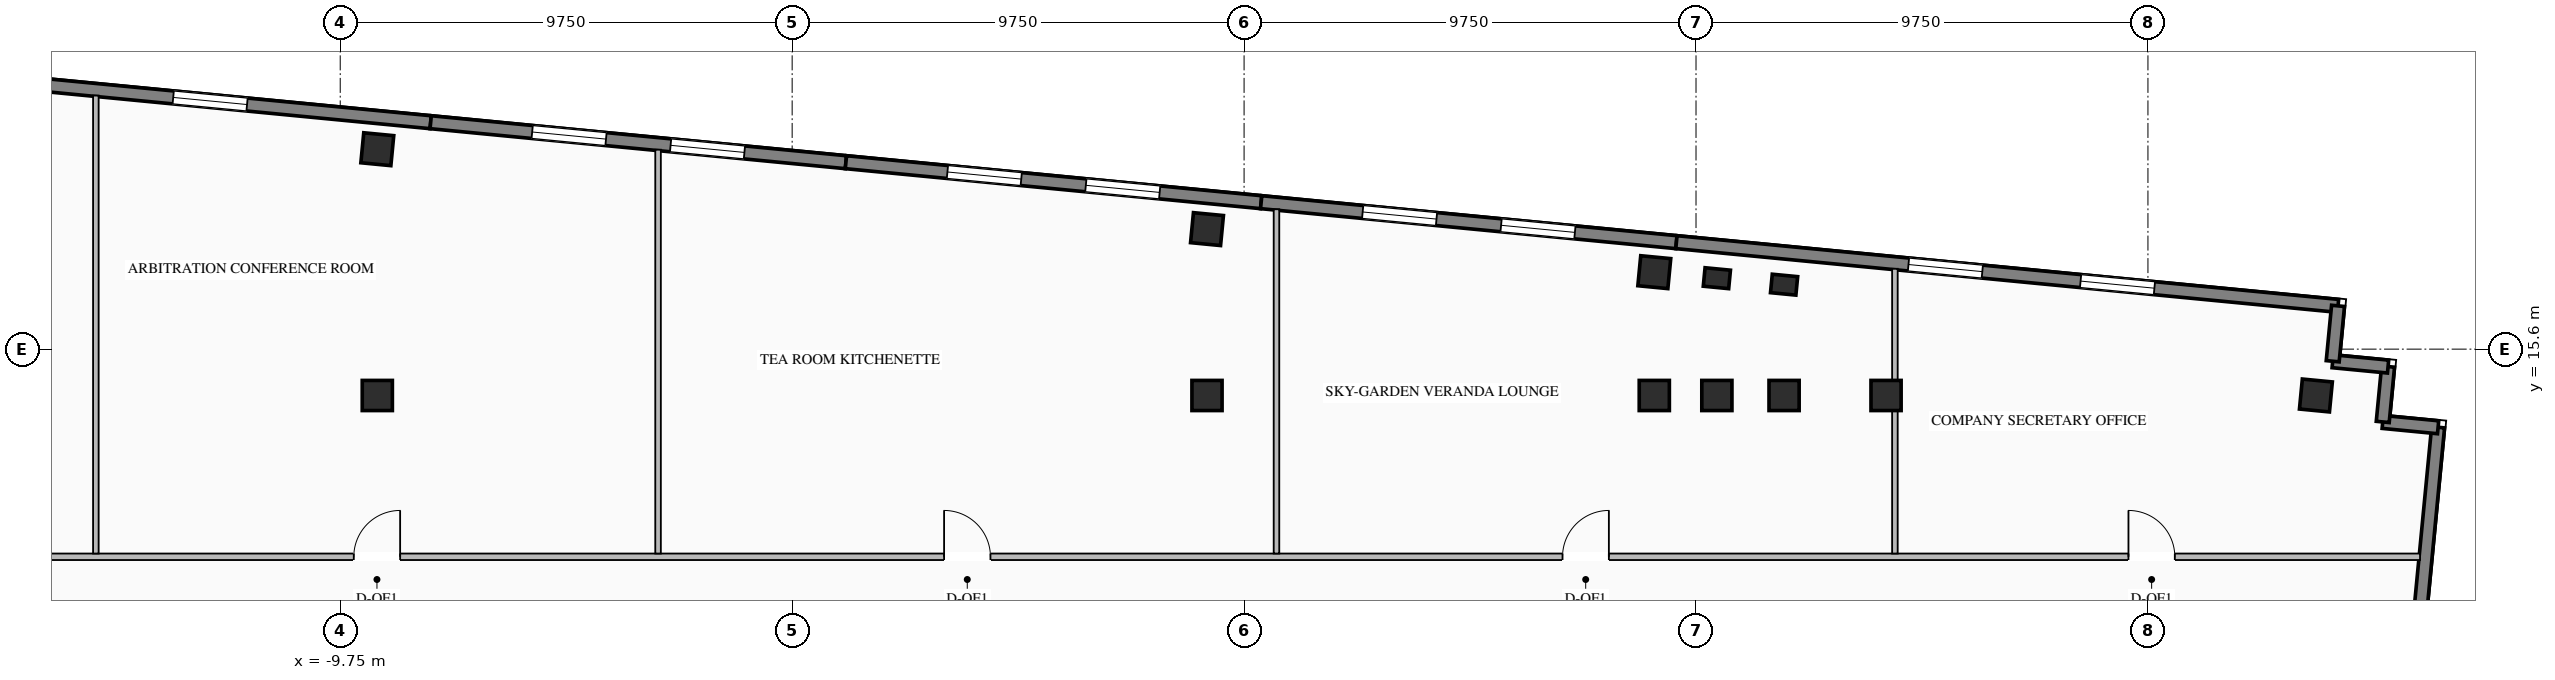
"""IFC4 building model, lengths in metres.
Left out: names, types, materials, properties, quantities, classifications, styles, units other than length and angle.
Written with IfcOpenShell. Run it as: python <this file> out.ifc"""

import sys

from ifc_helpers import new_model, si_unit, direction, frame, frame_2d, origin, origin_2d, place, context, subcontext, project, spatial, rectangle, i_section, extrude, element, fill, save


model = new_model("IFC4")
c1 = context("Model", 3, precision=1e-05, world=origin(), true_north=direction((0.0, 1.0)))
c2 = subcontext(c1, "Body", "Model", "MODEL_VIEW")
j1 = project(units=[si_unit("LENGTHUNIT", "METRE"), si_unit("PLANEANGLEUNIT", "RADIAN")], contexts=[c1])
p1 = place(None, origin())
s1 = spatial("IfcSite", under=j1, at=p1, CompositionType="ELEMENT")
p2 = place(p1, origin())
s2 = spatial("IfcBuilding", under=s1, at=p2, CompositionType="ELEMENT")
p3 = place(p2, frame((0.0, 0.0, 170.75)))
s3 = spatial("IfcBuildingStorey", under=s2, at=p3, CompositionType="ELEMENT", Elevation=170.75)
for number, where, z_axis, x_axis in (
    (1, (-8.95, 14.6, 0.0), (0.0, 0.0, 1.0), (1.0, 0.0, 0.0)),
    (2, (8.95, 14.6, 0.0), (0.0, 0.0, 1.0), (1.0, 0.0, 0.0)),
    (3, (18.6, 14.6, 0.0), (0.0, 0.0, 1.0), (1.0, 0.0, 0.0)),
    (4, (19.95, 14.6, 0.0), (0.0, 0.0, 1.0), (1.0, 0.0, 0.0)),
    (5, (21.4, 14.6, 0.0), (0.0, 0.0, 1.0), (1.0, 0.0, 0.0)),
    (6, (23.6, 14.6, 0.0), (0.0, 0.0, 1.0), (1.0, 0.0, 0.0)),
    (7, (-8.95, 19.913, 0.0), (0.0, 0.0, 1.0), (0.995, -0.096, 0.0)),
    (8, (8.95, 18.19, 0.0), (0.0, 0.0, 1.0), (0.995, -0.096, 0.0)),
    (9, (18.6, 17.26, 0.0), (0.0, 0.0, 1.0), (0.995, -0.096, 0.0)),
    (10, (32.874, 14.6, 0.0), (0.0, 0.0, 1.0), (0.995, -0.096, 0.0)),
):
    element("IfcColumn", number, at=place(p3, frame(where, z_axis=z_axis, x_axis=x_axis)), inside=s3, PredefinedType="COLUMN", context=c2, shape_type="SweptSolid", body=[
        extrude(i_section(OverallWidth=0.65, OverallDepth=0.65, WebThickness=0.028, FlangeThickness=0.04, at=origin_2d()), origin(), (0.0, 0.0, 1.0), 3.45),
    ])
for number, where, z_axis, x_axis in (
    (11, (19.95, 17.131, 0.0), (0.0, 0.0, 1.0), (0.995, -0.096, 0.0)),
    (12, (21.4, 16.991, 0.0), (0.0, 0.0, 1.0), (0.995, -0.096, 0.0)),
):
    element("IfcColumn", number, at=place(p3, frame(where, z_axis=z_axis, x_axis=x_axis)), inside=s3, PredefinedType="PILASTER", context=c2, shape_type="SweptSolid", body=[
        extrude(rectangle(XDim=0.55, YDim=0.4, at=origin_2d()), origin(), (0.0, 0.0, 1.0), 3.45),
    ])
p4 = place(p3, frame((-22.073, 21.87, 0.0), z_axis=(0.0, 0.0, 1.0), x_axis=(0.995395606285, -0.095851901334, 0.0)))
e13 = element("IfcWall", 13, at=p4, inside=s3, PredefinedType="STANDARD", context=c2, shape_type="SweptSolid", body=[
    extrude(rectangle(XDim=14.34, YDim=0.28, at=frame_2d((7.17, 0.0))), origin(), (0.0, 0.0, 1.0), 3.25),
])
p5 = place(p4, frame((3.98, 0.0, 0.76)))
e14 = element("IfcOpeningElement", 14, at=p5, cuts=e13, PredefinedType="OPENING", context=c2, shape_type="SweptSolid", body=[
    extrude(rectangle(XDim=1.6, YDim=1.95, at=frame_2d((0.8, 0.975))), frame((0.0, 0.15, 0.0), z_axis=(0.0, -1.0, 0.0), x_axis=(1.0, 0.0, 0.0)), (0.0, 0.0, 1.0), 0.3),
])
p6 = place(p4, frame((8.76, 0.0, 0.76)))
e15 = element("IfcOpeningElement", 15, at=p6, cuts=e13, PredefinedType="OPENING", context=c2, shape_type="SweptSolid", body=[
    extrude(rectangle(XDim=1.6, YDim=1.95, at=frame_2d((0.8, 0.975))), frame((0.0, 0.15, 0.0), z_axis=(0.0, -1.0, 0.0), x_axis=(1.0, 0.0, 0.0)), (0.0, 0.0, 1.0), 0.3),
])
p7 = place(p3, frame((-7.799, 20.496, 0.0), z_axis=(0.0, 0.0, 1.0), x_axis=(0.995396794462, -0.09583956164, 0.0)))
e16 = element("IfcWall", 16, at=p7, inside=s3, PredefinedType="STANDARD", context=c2, shape_type="SweptSolid", body=[
    extrude(rectangle(XDim=9.0, YDim=0.28, at=frame_2d((4.5, 0.0))), origin(), (0.0, 0.0, 1.0), 3.25),
])
p8 = place(p7, frame((2.2, 0.0, 0.76)))
e17 = element("IfcOpeningElement", 17, at=p8, cuts=e16, PredefinedType="OPENING", context=c2, shape_type="SweptSolid", body=[
    extrude(rectangle(XDim=1.6, YDim=1.95, at=frame_2d((0.8, 0.975))), frame((0.0, 0.15, 0.0), z_axis=(0.0, -1.0, 0.0), x_axis=(1.0, 0.0, 0.0)), (0.0, 0.0, 1.0), 0.3),
])
p9 = place(p7, frame((5.2, 0.0, 0.76)))
e18 = element("IfcOpeningElement", 18, at=p9, cuts=e16, PredefinedType="OPENING", context=c2, shape_type="SweptSolid", body=[
    extrude(rectangle(XDim=1.6, YDim=1.95, at=frame_2d((0.8, 0.975))), frame((0.0, 0.15, 0.0), z_axis=(0.0, -1.0, 0.0), x_axis=(1.0, 0.0, 0.0)), (0.0, 0.0, 1.0), 0.3),
])
p10 = place(p3, frame((1.16, 19.633, 0.0), z_axis=(0.0, 0.0, 1.0), x_axis=(0.995394455533, -0.09586385082, 0.0)))
e19 = element("IfcWall", 19, at=p10, inside=s3, PredefinedType="STANDARD", context=c2, shape_type="SweptSolid", body=[
    extrude(rectangle(XDim=9.0, YDim=0.28, at=frame_2d((4.5, 0.0))), origin(), (0.0, 0.0, 1.0), 3.25),
])
p11 = place(p10, frame((2.2, 0.0, 0.76)))
e20 = element("IfcOpeningElement", 20, at=p11, cuts=e19, PredefinedType="OPENING", context=c2, shape_type="SweptSolid", body=[
    extrude(rectangle(XDim=1.6, YDim=1.95, at=frame_2d((0.8, 0.975))), frame((0.0, 0.15, 0.0), z_axis=(0.0, -1.0, 0.0), x_axis=(1.0, 0.0, 0.0)), (0.0, 0.0, 1.0), 0.3),
])
p12 = place(p10, frame((5.2, 0.0, 0.76)))
e21 = element("IfcOpeningElement", 21, at=p12, cuts=e19, PredefinedType="OPENING", context=c2, shape_type="SweptSolid", body=[
    extrude(rectangle(XDim=1.6, YDim=1.95, at=frame_2d((0.8, 0.975))), frame((0.0, 0.15, 0.0), z_axis=(0.0, -1.0, 0.0), x_axis=(1.0, 0.0, 0.0)), (0.0, 0.0, 1.0), 0.3),
])
p13 = place(p3, frame((10.119, 18.77, 0.0), z_axis=(0.0, 0.0, 1.0), x_axis=(0.995396794462, -0.09583956164, 0.0)))
e22 = element("IfcWall", 22, at=p13, inside=s3, PredefinedType="STANDARD", context=c2, shape_type="SweptSolid", body=[
    extrude(rectangle(XDim=9.0, YDim=0.28, at=frame_2d((4.5, 0.0))), origin(), (0.0, 0.0, 1.0), 3.25),
])
p14 = place(p13, frame((2.2, 0.0, 0.76)))
e23 = element("IfcOpeningElement", 23, at=p14, cuts=e22, PredefinedType="OPENING", context=c2, shape_type="SweptSolid", body=[
    extrude(rectangle(XDim=1.6, YDim=1.95, at=frame_2d((0.8, 0.975))), frame((0.0, 0.15, 0.0), z_axis=(0.0, -1.0, 0.0), x_axis=(1.0, 0.0, 0.0)), (0.0, 0.0, 1.0), 0.3),
])
p15 = place(p13, frame((5.2, 0.0, 0.76)))
e24 = element("IfcOpeningElement", 24, at=p15, cuts=e22, PredefinedType="OPENING", context=c2, shape_type="SweptSolid", body=[
    extrude(rectangle(XDim=1.6, YDim=1.95, at=frame_2d((0.8, 0.975))), frame((0.0, 0.15, 0.0), z_axis=(0.0, -1.0, 0.0), x_axis=(1.0, 0.0, 0.0)), (0.0, 0.0, 1.0), 0.3),
])
p16 = place(p3, frame((19.077, 17.908, 0.0), z_axis=(0.0, 0.0, 1.0), x_axis=(0.995395606285, -0.095851901334, 0.0)))
e25 = element("IfcWall", 25, at=p16, inside=s3, PredefinedType="STANDARD", context=c2, shape_type="SweptSolid", body=[
    extrude(rectangle(XDim=14.34, YDim=0.28, at=frame_2d((7.17, 0.0))), origin(), (0.0, 0.0, 1.0), 3.25),
])
p17 = place(p16, frame((5.03, 0.0, 0.76)))
e26 = element("IfcOpeningElement", 26, at=p17, cuts=e25, PredefinedType="OPENING", context=c2, shape_type="SweptSolid", body=[
    extrude(rectangle(XDim=1.6, YDim=1.95, at=frame_2d((0.8, 0.975))), frame((0.0, 0.15, 0.0), z_axis=(0.0, -1.0, 0.0), x_axis=(1.0, 0.0, 0.0)), (0.0, 0.0, 1.0), 0.3),
])
p18 = place(p16, frame((8.76, 0.0, 0.76)))
e27 = element("IfcOpeningElement", 27, at=p18, cuts=e25, PredefinedType="OPENING", context=c2, shape_type="SweptSolid", body=[
    extrude(rectangle(XDim=1.6, YDim=1.95, at=frame_2d((0.8, 0.975))), frame((0.0, 0.15, 0.0), z_axis=(0.0, -1.0, 0.0), x_axis=(1.0, 0.0, 0.0)), (0.0, 0.0, 1.0), 0.3),
])
p19 = place(p3, frame((35.51, 13.914, 0.0), z_axis=(0.0, 0.0, 1.0), x_axis=(-0.095839027265, -0.995396845913, 0.0)))
e28 = element("IfcWall", 28, at=p19, inside=s3, PredefinedType="STANDARD", context=c2, shape_type="SweptSolid", body=[
    extrude(rectangle(XDim=16.79, YDim=0.28, at=frame_2d((8.395, 0.0))), origin(), (0.0, 0.0, 1.0), 3.25),
])
p20 = place(p19, frame((5.647, 0.0, 0.76)))
e29 = element("IfcOpeningElement", 29, at=p20, cuts=e28, PredefinedType="OPENING", context=c2, shape_type="SweptSolid", body=[
    extrude(rectangle(XDim=2.0, YDim=2.05, at=frame_2d((1.0, 1.025))), frame((0.0, 0.15, 0.0), z_axis=(0.0, -1.0, 0.0), x_axis=(1.0, 0.0, 0.0)), (0.0, 0.0, 1.0), 0.3),
])
p21 = place(p19, frame((11.243, 0.0, 0.76)))
e30 = element("IfcOpeningElement", 30, at=p21, cuts=e28, PredefinedType="OPENING", context=c2, shape_type="SweptSolid", body=[
    extrude(rectangle(XDim=2.0, YDim=2.05, at=frame_2d((1.0, 1.025))), frame((0.0, 0.15, 0.0), z_axis=(0.0, -1.0, 0.0), x_axis=(1.0, 0.0, 0.0)), (0.0, 0.0, 1.0), 0.3),
])
p22 = place(p3, frame((35.51, 13.914, 0.0), z_axis=(0.0, 0.0, 1.0), x_axis=(-0.995397091755, 0.095836473879, 0.0)))
e31 = element("IfcWall", 31, at=p22, inside=s3, PredefinedType="STANDARD", context=c2, shape_type="SweptSolid", body=[
    extrude(rectangle(XDim=1.2, YDim=0.28, at=frame_2d((0.6, 0.0))), origin(), (0.0, 0.0, 1.0), 3.25),
])
for number, where, z_axis, x_axis in (
    (32, (34.316, 14.029, 0.0), (0.0, 0.0, 1.0), (0.096, 0.995, 0.0)),
    (33, (34.431, 15.224, 0.0), (0.0, 0.0, 1.0), (-0.995, 0.096, 0.0)),
):
    element("IfcWall", number, at=place(p3, frame(where, z_axis=z_axis, x_axis=x_axis)), inside=s3, PredefinedType="STANDARD", context=c2, shape_type="SweptSolid", body=[
        extrude(rectangle(XDim=1.2, YDim=0.28, at=frame_2d((0.6, 0.0))), origin(), (0.0, 0.0, 1.0), 3.25),
    ])
p23 = place(p3, frame((33.236, 15.339, 0.0), z_axis=(0.0, 0.0, 1.0), x_axis=(0.095836473879, 0.995397091755, 0.0)))
e34 = element("IfcWall", 34, at=p23, inside=s3, PredefinedType="STANDARD", context=c2, shape_type="SweptSolid", body=[
    extrude(rectangle(XDim=1.2, YDim=0.28, at=frame_2d((0.6, 0.0))), origin(), (0.0, 0.0, 1.0), 3.25),
])
p24 = place(p3, frame((-25.398, 11.12, 0.0), z_axis=(0.0, 0.0, 1.0), x_axis=(1.0, 0.0, 0.0)))
e35 = element("IfcWall", 35, at=p24, inside=s3, PredefinedType="STANDARD", context=c2, shape_type="SweptSolid", body=[
    extrude(rectangle(XDim=60.519, YDim=0.14, at=frame_2d((30.259, 0.0))), origin(), (0.0, 0.0, 1.0), 3.25),
])
p25 = place(p24, frame((4.814, 0.0, 0.0)))
e36 = element("IfcOpeningElement", 36, at=p25, cuts=e35, PredefinedType="OPENING", context=c2, shape_type="SweptSolid", body=[
    extrude(rectangle(XDim=1.0, YDim=2.08, at=frame_2d((0.5, 1.04))), frame((0.0, 0.08, 0.0), z_axis=(0.0, -1.0, 0.0), x_axis=(1.0, 0.0, 0.0)), (0.0, 0.0, 1.0), 0.16),
])
p26 = place(p24, frame((15.941, 0.0, 0.0)))
e37 = element("IfcOpeningElement", 37, at=p26, cuts=e35, PredefinedType="OPENING", context=c2, shape_type="SweptSolid", body=[
    extrude(rectangle(XDim=1.0, YDim=2.08, at=frame_2d((0.5, 1.04))), frame((0.0, 0.08, 0.0), z_axis=(0.0, -1.0, 0.0), x_axis=(1.0, 0.0, 0.0)), (0.0, 0.0, 1.0), 0.16),
])
p27 = place(p24, frame((28.676, 0.0, 0.0)))
e38 = element("IfcOpeningElement", 38, at=p27, cuts=e35, PredefinedType="OPENING", context=c2, shape_type="SweptSolid", body=[
    extrude(rectangle(XDim=1.0, YDim=2.08, at=frame_2d((0.5, 1.04))), frame((0.0, 0.08, 0.0), z_axis=(0.0, -1.0, 0.0), x_axis=(1.0, 0.0, 0.0)), (0.0, 0.0, 1.0), 0.16),
])
p28 = place(p24, frame((42.018, 0.0, 0.0)))
e39 = element("IfcOpeningElement", 39, at=p28, cuts=e35, PredefinedType="OPENING", context=c2, shape_type="SweptSolid", body=[
    extrude(rectangle(XDim=1.0, YDim=2.08, at=frame_2d((0.5, 1.04))), frame((0.0, 0.08, 0.0), z_axis=(0.0, -1.0, 0.0), x_axis=(1.0, 0.0, 0.0)), (0.0, 0.0, 1.0), 0.16),
])
p29 = place(p24, frame((54.228, 0.0, 0.0)))
e40 = element("IfcOpeningElement", 40, at=p29, cuts=e35, PredefinedType="OPENING", context=c2, shape_type="SweptSolid", body=[
    extrude(rectangle(XDim=1.0, YDim=2.08, at=frame_2d((0.5, 1.04))), frame((0.0, 0.08, 0.0), z_axis=(0.0, -1.0, 0.0), x_axis=(1.0, 0.0, 0.0)), (0.0, 0.0, 1.0), 0.16),
])
p30 = place(p3, frame((-15.022, 11.19, 0.0), z_axis=(0.0, 0.0, 1.0), x_axis=(0.0, 1.0, 0.0)))
e41 = element("IfcWall", 41, at=p30, inside=s3, PredefinedType="STANDARD", context=c2, shape_type="SweptSolid", body=[
    extrude(rectangle(XDim=9.881, YDim=0.12, at=frame_2d((4.94, 0.0))), origin(), (0.0, 0.0, 1.0), 3.25),
])
p31 = place(p3, frame((-2.893, 11.19, 0.0), z_axis=(0.0, 0.0, 1.0), x_axis=(0.0, 1.0, 0.0)))
e42 = element("IfcWall", 42, at=p31, inside=s3, PredefinedType="STANDARD", context=c2, shape_type="SweptSolid", body=[
    extrude(rectangle(XDim=8.713, YDim=0.12, at=frame_2d((4.356, 0.0))), origin(), (0.0, 0.0, 1.0), 3.25),
])
p32 = place(p3, frame((10.449, 11.19, 0.0), z_axis=(0.0, 0.0, 1.0), x_axis=(0.0, 1.0, 0.0)))
e43 = element("IfcWall", 43, at=p32, inside=s3, PredefinedType="STANDARD", context=c2, shape_type="SweptSolid", body=[
    extrude(rectangle(XDim=7.428, YDim=0.12, at=frame_2d((3.714, 0.0))), origin(), (0.0, 0.0, 1.0), 3.25),
])
p33 = place(p3, frame((23.791, 11.19, 0.0), z_axis=(0.0, 0.0, 1.0), x_axis=(0.0, 1.0, 0.0)))
e44 = element("IfcWall", 44, at=p33, inside=s3, PredefinedType="STANDARD", context=c2, shape_type="SweptSolid", body=[
    extrude(rectangle(XDim=6.143, YDim=0.12, at=frame_2d((3.072, 0.0))), origin(), (0.0, 0.0, 1.0), 2.645),
])
p34 = place(p6, origin())
e45 = element("IfcWindow", 45, at=p34, inside=s3, PartitioningType="SINGLE_PANEL", PredefinedType="WINDOW", context=c2, shape_type="SweptSolid", body=[
    extrude(rectangle(XDim=1.6, YDim=1.95, at=frame_2d((0.8, 0.975))), frame((0.0, 0.03, 0.0), z_axis=(0.0, -1.0, 0.0), x_axis=(1.0, 0.0, 0.0)), (0.0, 0.0, 1.0), 0.06),
])
fill(e15, e45)
p35 = place(p8, origin())
e46 = element("IfcWindow", 46, at=p35, inside=s3, PartitioningType="SINGLE_PANEL", PredefinedType="WINDOW", context=c2, shape_type="SweptSolid", body=[
    extrude(rectangle(XDim=1.6, YDim=1.95, at=frame_2d((0.8, 0.975))), frame((0.0, 0.03, 0.0), z_axis=(0.0, -1.0, 0.0), x_axis=(1.0, 0.0, 0.0)), (0.0, 0.0, 1.0), 0.06),
])
fill(e17, e46)
p36 = place(p9, origin())
e47 = element("IfcWindow", 47, at=p36, inside=s3, PartitioningType="SINGLE_PANEL", PredefinedType="WINDOW", context=c2, shape_type="SweptSolid", body=[
    extrude(rectangle(XDim=1.6, YDim=1.95, at=frame_2d((0.8, 0.975))), frame((0.0, 0.03, 0.0), z_axis=(0.0, -1.0, 0.0), x_axis=(1.0, 0.0, 0.0)), (0.0, 0.0, 1.0), 0.06),
])
fill(e18, e47)
p37 = place(p11, origin())
e48 = element("IfcWindow", 48, at=p37, inside=s3, PartitioningType="SINGLE_PANEL", PredefinedType="WINDOW", context=c2, shape_type="SweptSolid", body=[
    extrude(rectangle(XDim=1.6, YDim=1.95, at=frame_2d((0.8, 0.975))), frame((0.0, 0.03, 0.0), z_axis=(0.0, -1.0, 0.0), x_axis=(1.0, 0.0, 0.0)), (0.0, 0.0, 1.0), 0.06),
])
fill(e20, e48)
p38 = place(p12, origin())
e49 = element("IfcWindow", 49, at=p38, inside=s3, PartitioningType="SINGLE_PANEL", PredefinedType="WINDOW", context=c2, shape_type="SweptSolid", body=[
    extrude(rectangle(XDim=1.6, YDim=1.95, at=frame_2d((0.8, 0.975))), frame((0.0, 0.03, 0.0), z_axis=(0.0, -1.0, 0.0), x_axis=(1.0, 0.0, 0.0)), (0.0, 0.0, 1.0), 0.06),
])
fill(e21, e49)
p39 = place(p14, origin())
e50 = element("IfcWindow", 50, at=p39, inside=s3, PartitioningType="SINGLE_PANEL", PredefinedType="WINDOW", context=c2, shape_type="SweptSolid", body=[
    extrude(rectangle(XDim=1.6, YDim=1.95, at=frame_2d((0.8, 0.975))), frame((0.0, 0.03, 0.0), z_axis=(0.0, -1.0, 0.0), x_axis=(1.0, 0.0, 0.0)), (0.0, 0.0, 1.0), 0.06),
])
fill(e23, e50)
p40 = place(p15, origin())
e51 = element("IfcWindow", 51, at=p40, inside=s3, PartitioningType="SINGLE_PANEL", PredefinedType="WINDOW", context=c2, shape_type="SweptSolid", body=[
    extrude(rectangle(XDim=1.6, YDim=1.95, at=frame_2d((0.8, 0.975))), frame((0.0, 0.03, 0.0), z_axis=(0.0, -1.0, 0.0), x_axis=(1.0, 0.0, 0.0)), (0.0, 0.0, 1.0), 0.06),
])
fill(e24, e51)
p41 = place(p17, origin())
e52 = element("IfcWindow", 52, at=p41, inside=s3, PartitioningType="SINGLE_PANEL", PredefinedType="WINDOW", context=c2, shape_type="SweptSolid", body=[
    extrude(rectangle(XDim=1.6, YDim=1.95, at=frame_2d((0.8, 0.975))), frame((0.0, 0.03, 0.0), z_axis=(0.0, -1.0, 0.0), x_axis=(1.0, 0.0, 0.0)), (0.0, 0.0, 1.0), 0.06),
])
fill(e26, e52)
p42 = place(p18, origin())
e53 = element("IfcWindow", 53, at=p42, inside=s3, PartitioningType="SINGLE_PANEL", PredefinedType="WINDOW", context=c2, shape_type="SweptSolid", body=[
    extrude(rectangle(XDim=1.6, YDim=1.95, at=frame_2d((0.8, 0.975))), frame((0.0, 0.03, 0.0), z_axis=(0.0, -1.0, 0.0), x_axis=(1.0, 0.0, 0.0)), (0.0, 0.0, 1.0), 0.06),
])
fill(e27, e53)
p43 = place(p26, origin())
e54 = element("IfcDoor", 54, at=p43, inside=s3, OperationType="SINGLE_SWING_RIGHT", PredefinedType="DOOR", context=c2, shape_type="SweptSolid", body=[
    extrude(rectangle(XDim=1.0, YDim=2.08, at=frame_2d((0.5, 1.04))), frame((0.0, 0.025, 0.0), z_axis=(0.0, -1.0, 0.0), x_axis=(1.0, 0.0, 0.0)), (0.0, 0.0, 1.0), 0.05),
])
fill(e37, e54)
p44 = place(p27, origin())
e55 = element("IfcDoor", 55, at=p44, inside=s3, OperationType="SINGLE_SWING_LEFT", PredefinedType="DOOR", context=c2, shape_type="SweptSolid", body=[
    extrude(rectangle(XDim=1.0, YDim=2.08, at=frame_2d((0.5, 1.04))), frame((0.0, 0.025, 0.0), z_axis=(0.0, -1.0, 0.0), x_axis=(1.0, 0.0, 0.0)), (0.0, 0.0, 1.0), 0.05),
])
fill(e38, e55)
p45 = place(p28, origin())
e56 = element("IfcDoor", 56, at=p45, inside=s3, OperationType="SINGLE_SWING_RIGHT", PredefinedType="DOOR", context=c2, shape_type="SweptSolid", body=[
    extrude(rectangle(XDim=1.0, YDim=2.08, at=frame_2d((0.5, 1.04))), frame((0.0, 0.025, 0.0), z_axis=(0.0, -1.0, 0.0), x_axis=(1.0, 0.0, 0.0)), (0.0, 0.0, 1.0), 0.05),
])
fill(e39, e56)
p46 = place(p29, origin())
e57 = element("IfcDoor", 57, at=p46, inside=s3, OperationType="SINGLE_SWING_LEFT", PredefinedType="DOOR", context=c2, shape_type="SweptSolid", body=[
    extrude(rectangle(XDim=1.0, YDim=2.08, at=frame_2d((0.5, 1.04))), frame((0.0, 0.025, 0.0), z_axis=(0.0, -1.0, 0.0), x_axis=(1.0, 0.0, 0.0)), (0.0, 0.0, 1.0), 0.05),
])
fill(e40, e57)
save(model, sys.argv[1])
